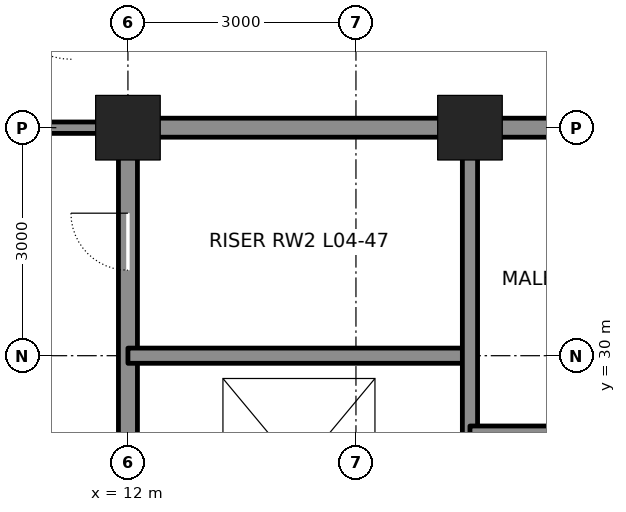
"""IFC4 building model, lengths in metres.
Left out: names, types, materials, properties, quantities, classifications, styles, units other than length and angle.
Written with IfcOpenShell. Run it as: python <this file> out.ifc"""

import sys

from ifc_helpers import new_model, si_unit, direction, frame, frame_2d, origin, origin_2d, place, context, subcontext, project, spatial, rectangle, hollow_rectangle, extrude, element, fill, save


model = new_model("IFC4")
c1 = context("Model", 3, precision=1e-05, world=origin(), true_north=direction((0.0, 1.0)))
c2 = subcontext(c1, "Body", "Model", "MODEL_VIEW")
j1 = project(units=[si_unit("LENGTHUNIT", "METRE"), si_unit("PLANEANGLEUNIT", "RADIAN")], contexts=[c1])
p1 = place(None, origin())
s1 = spatial("IfcSite", under=j1, at=p1, CompositionType="ELEMENT")
p2 = place(p1, origin())
s2 = spatial("IfcBuilding", under=s1, at=p2, CompositionType="ELEMENT")
p3 = place(p2, frame((0.0, 0.0, 24.3)))
s3 = spatial("IfcBuildingStorey", under=s2, at=p3, CompositionType="ELEMENT", Elevation=24.3)
for number, where, z_axis, x_axis in (
    (1, (12.0, 33.0, 0.0), (0.0, 0.0, 1.0), (1.0, 0.0, 0.0)),
    (2, (16.5, 33.0, 0.0), (0.0, 0.0, 1.0), (1.0, 0.0, 0.0)),
):
    element("IfcColumn", number, at=place(p3, frame(where, z_axis=z_axis, x_axis=x_axis)), inside=s3, PredefinedType="COLUMN", context=c2, shape_type="SweptSolid", body=[
        extrude(hollow_rectangle(XDim=0.85, YDim=0.85, WallThickness=0.085, at=origin_2d()), origin(), (0.0, 0.0, 1.0), 4.5),
    ])
p4 = place(p3, frame((12.0, 24.25, 0.0), z_axis=(0.0, 0.0, 1.0), x_axis=(0.0, 1.0, 0.0)))
e3 = element("IfcWall", 3, at=p4, inside=s3, PredefinedType="SOLIDWALL", context=c2, shape_type="SweptSolid", body=[
    extrude(rectangle(XDim=8.5, YDim=0.25, at=frame_2d((4.25, 0.0))), origin(), (0.0, 0.0, 1.0), 3.113),
])
p5 = place(p4, frame((0.65, 0.0, 0.0)))
e4 = element("IfcOpeningElement", 4, at=p5, cuts=e3, PredefinedType="OPENING", context=c2, shape_type="SweptSolid", body=[
    extrude(rectangle(XDim=1.2, YDim=2.1, at=frame_2d((0.6, 1.05))), frame((0.0, 0.135, 0.0), z_axis=(0.0, -1.0, 0.0), x_axis=(1.0, 0.0, 0.0)), (0.0, 0.0, 1.0), 0.27),
])
p6 = place(p4, frame((6.875, 0.0, 0.0)))
e5 = element("IfcOpeningElement", 5, at=p6, cuts=e3, PredefinedType="OPENING", context=c2, shape_type="SweptSolid", body=[
    extrude(rectangle(XDim=0.75, YDim=2.1, at=frame_2d((0.375, 1.05))), frame((0.0, 0.135, 0.0), z_axis=(0.0, -1.0, 0.0), x_axis=(1.0, 0.0, 0.0)), (0.0, 0.0, 1.0), 0.27),
])
p7 = place(p3, frame((12.0, 30.0, 0.0), z_axis=(0.0, 0.0, 1.0), x_axis=(1.0, 0.0, 0.0)))
e6 = element("IfcWall", 6, at=p7, inside=s3, PredefinedType="SOLIDWALL", context=c2, shape_type="SweptSolid", body=[
    extrude(rectangle(XDim=4.5, YDim=0.2, at=frame_2d((2.25, 0.0))), origin(), (0.0, 0.0, 1.0), 4.34),
])
p8 = place(p3, frame((12.25, 33.0, 0.0), z_axis=(0.0, 0.0, 1.0), x_axis=(1.0, 0.0, 0.0)))
e7 = element("IfcWall", 7, at=p8, inside=s3, PredefinedType="SOLIDWALL", context=c2, shape_type="SweptSolid", body=[
    extrude(rectangle(XDim=4.0, YDim=0.25, at=frame_2d((2.0, 0.0))), origin(), (0.0, 0.0, 1.0), 3.181),
])
p9 = place(p3, frame((16.75, 33.0, 0.0), z_axis=(0.0, 0.0, 1.0), x_axis=(1.0, 0.0, 0.0)))
e8 = element("IfcWall", 8, at=p9, inside=s3, PredefinedType="SOLIDWALL", context=c2, shape_type="SweptSolid", body=[
    extrude(rectangle(XDim=2.5, YDim=0.25, at=frame_2d((1.25, 0.0))), origin(), (0.0, 0.0, 1.0), 3.181),
])
p10 = place(p3, frame((16.5, 24.25, 0.0), z_axis=(0.0, 0.0, 1.0), x_axis=(0.0, 1.0, 0.0)))
e9 = element("IfcWall", 9, at=p10, inside=s3, PredefinedType="SOLIDWALL", context=c2, shape_type="SweptSolid", body=[
    extrude(rectangle(XDim=8.5, YDim=0.2, at=frame_2d((4.25, 0.0))), origin(), (0.0, 0.0, 1.0), 3.413),
])
p11 = place(p3, frame((16.5, 29.0, 0.0), z_axis=(0.0, 0.0, 1.0), x_axis=(1.0, 0.0, 0.0)))
e10 = element("IfcWall", 10, at=p11, inside=s3, PredefinedType="PARTITIONING", context=c2, shape_type="SweptSolid", body=[
    extrude(rectangle(XDim=3.0, YDim=0.15, at=frame_2d((1.5, 0.0))), origin(), (0.0, 0.0, 1.0), 4.34),
])
p12 = place(p3, frame((10.2, 33.0, -0.3), z_axis=(0.0, 0.0, 1.0), x_axis=(1.0, 0.0, 0.0)))
e11 = element("IfcWall", 11, at=p12, inside=s3, PredefinedType="PARTITIONING", context=c2, shape_type="SweptSolid", body=[
    extrude(rectangle(XDim=1.8, YDim=0.15, at=frame_2d((0.9, 0.0))), origin(), (0.0, 0.0, 1.0), 3.481),
])
p13 = place(p6, origin())
e12 = element("IfcDoor", 12, at=p13, inside=s3, OperationType="SINGLE_SWING_RIGHT", PredefinedType="DOOR", context=c2, shape_type="SweptSolid", body=[
    extrude(rectangle(XDim=0.75, YDim=2.1, at=frame_2d((0.375, 1.05))), frame((0.0, 0.025, 0.0), z_axis=(0.0, -1.0, 0.0), x_axis=(1.0, 0.0, 0.0)), (0.0, 0.0, 1.0), 0.05),
])
fill(e5, e12)
save(model, sys.argv[1])
